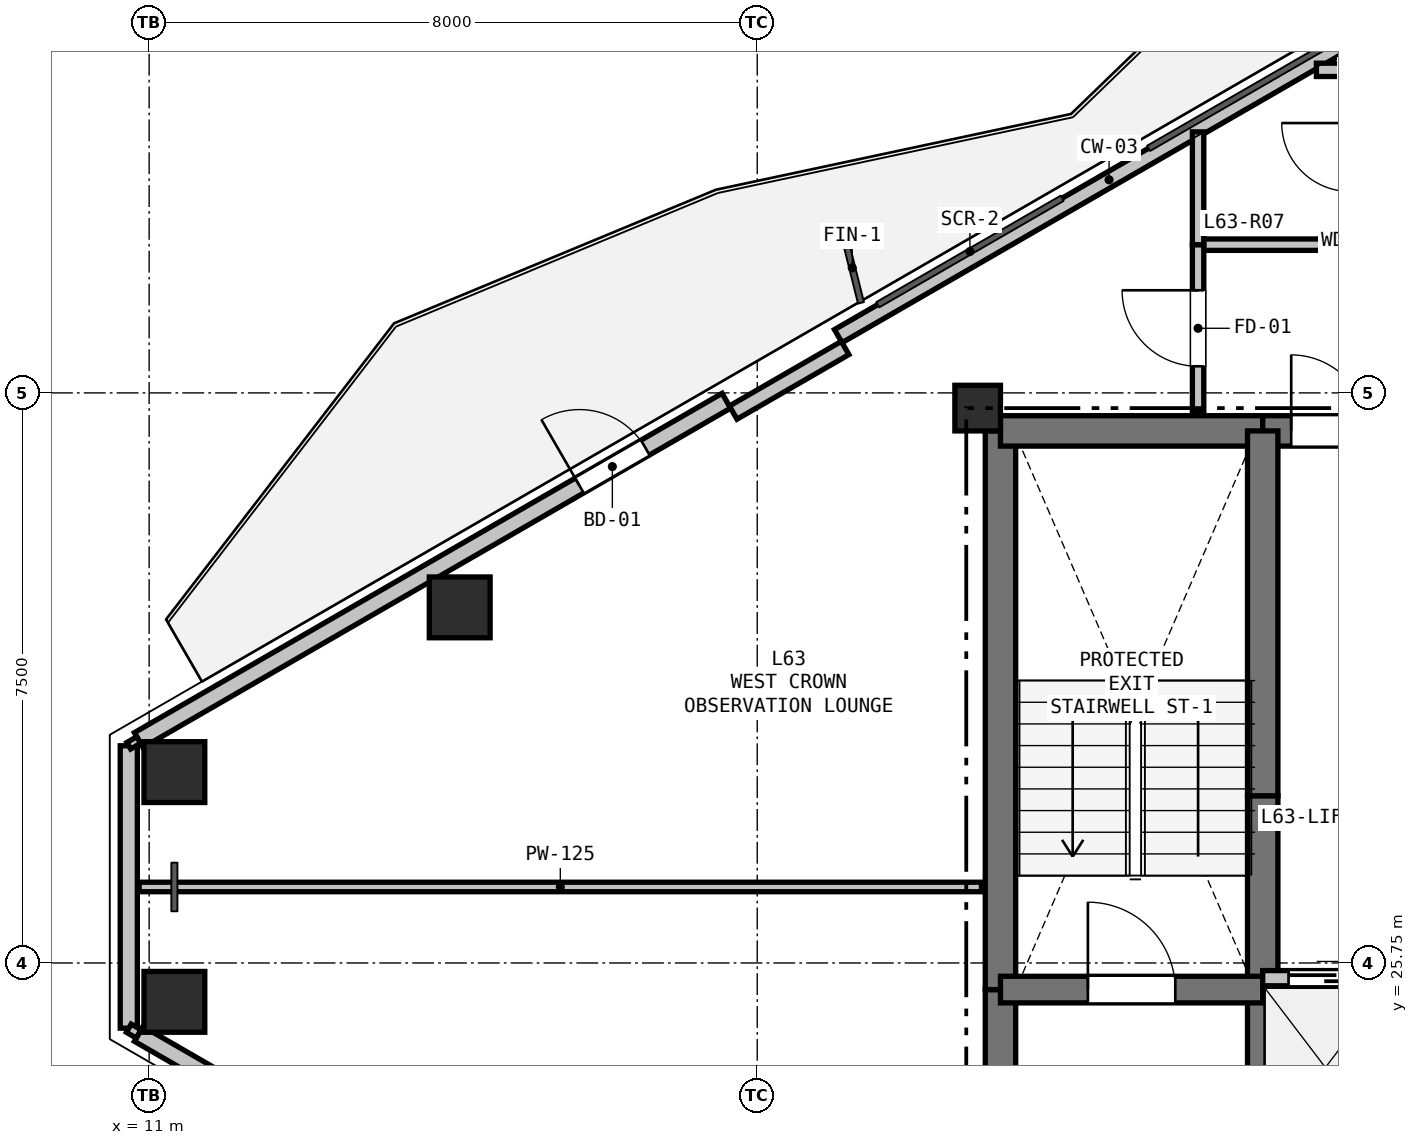
"""IFC4 building model, lengths in metres.
Left out: names, types, materials, properties, quantities, classifications, styles, units other than length and angle.
Written with IfcOpenShell. Run it as: python <this file> out.ifc"""

import sys

from ifc_helpers import new_model, si_unit, direction, frame, frame_2d, origin, origin_2d, place, context, subcontext, project, spatial, rectangle, hollow_rectangle, extrude, element, fill, save


model = new_model("IFC4")
c1 = context("Model", 3, precision=1e-05, world=origin(), true_north=direction((0.0, 1.0)))
c2 = subcontext(c1, "Body", "Model", "MODEL_VIEW")
j1 = project(units=[si_unit("LENGTHUNIT", "METRE"), si_unit("PLANEANGLEUNIT", "RADIAN")], contexts=[c1])
p1 = place(None, origin())
s1 = spatial("IfcSite", under=j1, at=p1, CompositionType="ELEMENT")
p2 = place(p1, origin())
s2 = spatial("IfcBuilding", under=s1, at=p2, CompositionType="ELEMENT")
p3 = place(p2, frame((0.0, 0.0, 226.5)))
s3 = spatial("IfcBuildingStorey", under=s2, at=p3, CompositionType="ELEMENT", Elevation=226.5)
p4 = place(p3, frame((21.9, 33.05, 0.0), z_axis=(0.0, 0.0, 1.0), x_axis=(1.0, 0.0, 0.0)))
e1 = element("IfcColumn", 1, at=p4, inside=s3, PredefinedType="COLUMN", context=c2, shape_type="SweptSolid", body=[
    extrude(rectangle(XDim=0.6, YDim=0.6, at=origin_2d()), origin(), (0.0, 0.0, 1.0), 3.3),
])
for number, where, z_axis, x_axis in (
    (2, (11.332, 28.261, 0.0), (0.0, 0.0, 1.0), (1.0, 0.0, 0.0)),
    (3, (15.086, 30.428, 0.0), (0.0, 0.0, 1.0), (1.0, 0.0, 0.0)),
    (4, (11.332, 25.239, 0.0), (0.0, 0.0, 1.0), (1.0, 0.0, 0.0)),
):
    element("IfcColumn", number, at=place(p3, frame(where, z_axis=z_axis, x_axis=x_axis)), inside=s3, PredefinedType="COLUMN", context=c2, shape_type="SweptSolid", body=[
        extrude(hollow_rectangle(XDim=0.8, YDim=0.8, WallThickness=0.025, at=origin_2d()), origin(), (0.0, 0.0, 1.0), 3.3),
    ])
p5 = place(p3, frame((10.732, 24.892, 0.0), z_axis=(0.0, 0.0, 1.0), x_axis=(0.0, 1.0, 0.0)))
e5 = element("IfcWall", 5, at=p5, inside=s3, PredefinedType="SOLIDWALL", context=c2, shape_type="SweptSolid", body=[
    extrude(rectangle(XDim=3.715, YDim=0.225, at=frame_2d((1.858, 0.0))), origin(), (0.0, 0.0, 1.0), 2.7),
])
p6 = place(p3, frame((10.862, 28.683, 0.0), z_axis=(0.0, 0.0, 1.0), x_axis=(0.866026655105, 0.499997832642, 0.0)))
e6 = element("IfcWall", 6, at=p6, inside=s3, PredefinedType="SOLIDWALL", context=c2, shape_type="SweptSolid", body=[
    extrude(rectangle(XDim=8.928, YDim=0.225, at=frame_2d((4.464, 0.0))), origin(), (0.0, 0.0, 1.0), 2.7),
])
p7 = place(p6, frame((6.696, 0.0, 0.0)))
e7 = element("IfcOpeningElement", 7, at=p7, cuts=e6, PredefinedType="OPENING", context=c2, shape_type="SweptSolid", body=[
    extrude(rectangle(XDim=1.0, YDim=2.1, at=frame_2d((0.5, 1.05))), frame((0.0, 0.123, 0.0), z_axis=(0.0, -1.0, 0.0), x_axis=(1.0, 0.0, 0.0)), (0.0, 0.0, 1.0), 0.245),
])
p8 = place(p3, frame((20.066, 33.997, 0.0), z_axis=(0.0, 0.0, 1.0), x_axis=(0.866019557082, 0.500010126649, 0.0)))
e8 = element("IfcWall", 8, at=p8, inside=s3, PredefinedType="PARAPET", context=c2, shape_type="SweptSolid", body=[
    extrude(rectangle(XDim=8.228, YDim=0.2, at=frame_2d((4.114, 0.0))), origin(), (0.0, 0.0, 1.0), 0.2),
])
p9 = place(p3, frame((18.684, 32.991, 0.0), z_axis=(0.0, 0.0, 1.0), x_axis=(0.866025371046, 0.500000056704, 0.0)))
e9 = element("IfcWall", 9, at=p9, inside=s3, PredefinedType="PARAPET", context=c2, shape_type="SweptSolid", body=[
    extrude(rectangle(XDim=1.7, YDim=0.2, at=frame_2d((0.85, 0.0))), origin(), (0.0, 0.0, 1.0), 2.7),
])
p10 = place(p3, frame((18.594, 20.354, 0.0), z_axis=(0.0, 0.0, 1.0), x_axis=(-0.866026655105, 0.499997832642, 0.0)))
e10 = element("IfcWall", 10, at=p10, inside=s3, PredefinedType="SOLIDWALL", context=c2, shape_type="SweptSolid", body=[
    extrude(rectangle(XDim=8.928, YDim=0.225, at=frame_2d((4.464, 0.0))), origin(), (0.0, 0.0, 1.0), 2.7),
])
p11 = place(p3, frame((22.2, 20.75, 0.0), z_axis=(0.0, 0.0, 1.0), x_axis=(0.0, 1.0, 0.0)))
e11 = element("IfcWall", 11, at=p11, inside=s3, PredefinedType="SHEAR", context=c2, shape_type="SweptSolid", body=[
    extrude(rectangle(XDim=4.65, YDim=0.4, at=frame_2d((2.325, 0.0))), origin(), (0.0, 0.0, 1.0), 3.08),
])
p12 = place(p3, frame((22.2, 25.4, 0.0), z_axis=(0.0, 0.0, 1.0), x_axis=(0.0, 1.0, 0.0)))
e12 = element("IfcWall", 12, at=p12, inside=s3, PredefinedType="SHEAR", context=c2, shape_type="SweptSolid", body=[
    extrude(rectangle(XDim=7.35, YDim=0.4, at=frame_2d((3.675, 0.0))), origin(), (0.0, 0.0, 1.0), 3.08),
])
p13 = place(p3, frame((22.2, 32.75, 0.0), z_axis=(0.0, 0.0, 1.0), x_axis=(1.0, 0.0, 0.0)))
e13 = element("IfcWall", 13, at=p13, inside=s3, PredefinedType="SHEAR", context=c2, shape_type="SweptSolid", body=[
    extrude(rectangle(XDim=3.45, YDim=0.4, at=frame_2d((1.725, 0.0))), origin(), (0.0, 0.0, 1.0), 3.08),
])
p14 = place(p3, frame((25.65, 32.75, 0.0), z_axis=(0.0, 0.0, 1.0), x_axis=(1.0, 0.0, 0.0)))
e14 = element("IfcWall", 14, at=p14, inside=s3, PredefinedType="SHEAR", context=c2, shape_type="SweptSolid", body=[
    extrude(rectangle(XDim=1.75, YDim=0.4, at=frame_2d((0.875, 0.0))), origin(), (0.0, 0.0, 1.0), 3.08),
])
p15 = place(p14, frame((0.375, 0.0, 0.0)))
e15 = element("IfcOpeningElement", 15, at=p15, cuts=e14, PredefinedType="OPENING", context=c2, shape_type="SweptSolid", body=[
    extrude(rectangle(XDim=1.0, YDim=2.15, at=frame_2d((0.5, 1.075))), frame((0.0, 0.21, 0.0), z_axis=(0.0, -1.0, 0.0), x_axis=(1.0, 0.0, 0.0)), (0.0, 0.0, 1.0), 0.42),
])
p16 = place(p3, frame((25.65, 22.75, 0.0), z_axis=(0.0, 0.0, 1.0), x_axis=(0.0, 1.0, 0.0)))
e16 = element("IfcWall", 16, at=p16, inside=s3, PredefinedType="SHEAR", context=c2, shape_type="SweptSolid", body=[
    extrude(rectangle(XDim=2.8, YDim=0.4, at=frame_2d((1.4, 0.0))), origin(), (0.0, 0.0, 1.0), 3.08),
])
p17 = place(p3, frame((25.65, 25.55, 0.0), z_axis=(0.0, 0.0, 1.0), x_axis=(0.0, 1.0, 0.0)))
e17 = element("IfcWall", 17, at=p17, inside=s3, PredefinedType="SHEAR", context=c2, shape_type="SweptSolid", body=[
    extrude(rectangle(XDim=2.4, YDim=0.4, at=frame_2d((1.2, 0.0))), origin(), (0.0, 0.0, 1.0), 3.08),
])
p18 = place(p3, frame((25.65, 27.95, 0.0), z_axis=(0.0, 0.0, 1.0), x_axis=(0.0, 1.0, 0.0)))
e18 = element("IfcWall", 18, at=p18, inside=s3, PredefinedType="SHEAR", context=c2, shape_type="SweptSolid", body=[
    extrude(rectangle(XDim=4.8, YDim=0.4, at=frame_2d((2.4, 0.0))), origin(), (0.0, 0.0, 1.0), 3.08),
])
p19 = place(p3, frame((22.2, 25.4, 0.0), z_axis=(0.0, 0.0, 1.0), x_axis=(1.0, 0.0, 0.0)))
e19 = element("IfcWall", 19, at=p19, inside=s3, PredefinedType="SHEAR", context=c2, shape_type="SweptSolid", body=[
    extrude(rectangle(XDim=3.45, YDim=0.35, at=frame_2d((1.725, 0.0))), origin(), (0.0, 0.0, 1.0), 3.08),
])
p20 = place(p19, frame((1.15, 0.0, 0.0)))
e20 = element("IfcOpeningElement", 20, at=p20, cuts=e19, PredefinedType="OPENING", context=c2, shape_type="SweptSolid", body=[
    extrude(rectangle(XDim=1.15, YDim=2.15, at=frame_2d((0.575, 1.075))), frame((0.0, 0.185, 0.0), z_axis=(0.0, -1.0, 0.0), x_axis=(1.0, 0.0, 0.0)), (0.0, 0.0, 1.0), 0.37),
])
p21 = place(p3, frame((25.65, 25.55, 0.0), z_axis=(0.0, 0.0, 1.0), x_axis=(1.0, 0.0, 0.0)))
e21 = element("IfcWall", 21, at=p21, inside=s3, PredefinedType="PARTITIONING", context=c2, shape_type="SweptSolid", body=[
    extrude(rectangle(XDim=4.95, YDim=0.2, at=frame_2d((2.475, 0.0))), origin(), (0.0, 0.0, 1.0), 3.08),
])
p22 = place(p21, frame((0.34, 0.0, 0.0)))
e22 = element("IfcOpeningElement", 22, at=p22, cuts=e21, PredefinedType="OPENING", context=c2, shape_type="SweptSolid", body=[
    extrude(rectangle(XDim=1.1, YDim=2.15, at=frame_2d((0.55, 1.075))), frame((0.0, 0.11, 0.0), z_axis=(0.0, -1.0, 0.0), x_axis=(1.0, 0.0, 0.0)), (0.0, 0.0, 1.0), 0.22),
])
p23 = place(p21, frame((1.99, 0.0, 0.0)))
e23 = element("IfcOpeningElement", 23, at=p23, cuts=e21, PredefinedType="OPENING", context=c2, shape_type="SweptSolid", body=[
    extrude(rectangle(XDim=1.1, YDim=2.15, at=frame_2d((0.55, 1.075))), frame((0.0, 0.11, 0.0), z_axis=(0.0, -1.0, 0.0), x_axis=(1.0, 0.0, 0.0)), (0.0, 0.0, 1.0), 0.22),
])
p24 = place(p21, frame((3.64, 0.0, 0.0)))
e24 = element("IfcOpeningElement", 24, at=p24, cuts=e21, PredefinedType="OPENING", context=c2, shape_type="SweptSolid", body=[
    extrude(rectangle(XDim=1.1, YDim=2.15, at=frame_2d((0.55, 1.075))), frame((0.0, 0.11, 0.0), z_axis=(0.0, -1.0, 0.0), x_axis=(1.0, 0.0, 0.0)), (0.0, 0.0, 1.0), 0.22),
])
p25 = place(p3, frame((24.8, 35.2, 0.0), z_axis=(0.0, 0.0, 1.0), x_axis=(1.0, 0.0, 0.0)))
e25 = element("IfcWall", 25, at=p25, inside=s3, PredefinedType="PARTITIONING", context=c2, shape_type="SweptSolid", body=[
    extrude(rectangle(XDim=2.0, YDim=0.15, at=frame_2d((1.0, 0.0))), origin(), (0.0, 0.0, 1.0), 3.08),
])
p26 = place(p3, frame((24.8, 33.0, 0.0), z_axis=(0.0, 0.0, 1.0), x_axis=(0.0, 1.0, 0.0)))
e26 = element("IfcWall", 26, at=p26, inside=s3, PredefinedType="PARTITIONING", context=c2, shape_type="SweptSolid", body=[
    extrude(rectangle(XDim=2.2, YDim=0.15, at=frame_2d((1.1, 0.0))), origin(), (0.0, 0.0, 1.0), 2.605),
])
p27 = place(p26, frame((0.6, 0.0, 0.0)))
e27 = element("IfcOpeningElement", 27, at=p27, cuts=e26, PredefinedType="OPENING", context=c2, shape_type="SweptSolid", body=[
    extrude(rectangle(XDim=1.0, YDim=2.15, at=frame_2d((0.5, 1.075))), frame((0.0, 0.085, 0.0), z_axis=(0.0, -1.0, 0.0), x_axis=(1.0, 0.0, 0.0)), (0.0, 0.0, 1.0), 0.17),
])
p28 = place(p3, frame((24.8, 35.2, 0.0), z_axis=(0.0, 0.0, 1.0), x_axis=(0.0, 1.0, 0.0)))
e28 = element("IfcWall", 28, at=p28, inside=s3, PredefinedType="PARTITIONING", context=c2, shape_type="SweptSolid", body=[
    extrude(rectangle(XDim=1.484, YDim=0.15, at=frame_2d((0.742, 0.0))), origin(), (0.0, 0.0, 1.0), 2.365),
])
p29 = place(p3, frame((26.357, 37.5, 0.0), z_axis=(0.0, 0.0, 1.0), x_axis=(1.0, 0.0, 0.0)))
e29 = element("IfcWall", 29, at=p29, inside=s3, PredefinedType="PLUMBINGWALL", context=c2, shape_type="SweptSolid", body=[
    extrude(rectangle(XDim=0.428, YDim=0.175, at=frame_2d((0.214, 0.0))), origin(), (0.0, 0.0, 1.0), 3.08),
])
p30 = place(p3, frame((21.95, 26.75, 0.0), z_axis=(0.0, 0.0, 1.0), x_axis=(-1.0, 0.0, 0.0)))
e30 = element("IfcWall", 30, at=p30, inside=s3, PredefinedType="PARTITIONING", context=c2, shape_type="SweptSolid", body=[
    extrude(rectangle(XDim=11.082, YDim=0.125, at=frame_2d((5.541, 0.0))), origin(), (0.0, 0.0, 1.0), 2.605),
])
p31 = place(p3, frame((10.732, 28.608, 0.0), z_axis=(0.0, 0.0, 1.0), x_axis=(0.866131372301, 0.499816412211, 0.0)))
e31 = element("IfcWall", 31, at=p31, inside=s3, PredefinedType="PARTITIONING", context=c2, shape_type="SweptSolid", body=[
    extrude(rectangle(XDim=0.15, YDim=0.1, at=frame_2d((0.075, 0.0))), origin(), (0.0, 0.0, 1.0), 3.08),
])
p32 = place(p3, frame((10.862, 24.817, 0.0), z_axis=(0.0, 0.0, 1.0), x_axis=(-0.866131372301, 0.499816412211, 0.0)))
e32 = element("IfcWall", 32, at=p32, inside=s3, PredefinedType="PARTITIONING", context=c2, shape_type="SweptSolid", body=[
    extrude(rectangle(XDim=0.15, YDim=0.125, at=frame_2d((0.075, 0.0))), origin(), (0.0, 0.0, 1.0), 3.08),
])
p33 = place(p7, origin())
e33 = element("IfcDoor", 33, at=p33, inside=s3, OperationType="SINGLE_SWING_LEFT", PredefinedType="DOOR", context=c2, shape_type="SweptSolid", body=[
    extrude(rectangle(XDim=1.0, YDim=2.1, at=frame_2d((0.5, 1.05))), frame((0.0, 0.025, 0.0), z_axis=(0.0, -1.0, 0.0), x_axis=(1.0, 0.0, 0.0)), (0.0, 0.0, 1.0), 0.05),
])
fill(e7, e33)
p34 = place(p22, origin())
e34 = element("IfcDoor", 34, at=p34, inside=s3, OperationType="SLIDING_TO_LEFT", PredefinedType="DOOR", context=c2, shape_type="SweptSolid", body=[
    extrude(rectangle(XDim=1.1, YDim=2.15, at=frame_2d((0.55, 1.075))), frame((0.0, 0.025, 0.0), z_axis=(0.0, -1.0, 0.0), x_axis=(1.0, 0.0, 0.0)), (0.0, 0.0, 1.0), 0.05),
])
fill(e22, e34)
p35 = place(p15, origin())
e35 = element("IfcDoor", 35, at=p35, inside=s3, OperationType="SINGLE_SWING_LEFT", PredefinedType="DOOR", context=c2, shape_type="SweptSolid", body=[
    extrude(rectangle(XDim=1.0, YDim=2.15, at=frame_2d((0.5, 1.075))), frame((0.0, 0.025, 0.0), z_axis=(0.0, -1.0, 0.0), x_axis=(1.0, 0.0, 0.0)), (0.0, 0.0, 1.0), 0.05),
])
fill(e15, e35)
p36 = place(p20, origin())
e36 = element("IfcDoor", 36, at=p36, inside=s3, OperationType="SINGLE_SWING_LEFT", PredefinedType="DOOR", context=c2, shape_type="SweptSolid", body=[
    extrude(rectangle(XDim=1.15, YDim=2.15, at=frame_2d((0.575, 1.075))), frame((0.0, 0.025, 0.0), z_axis=(0.0, -1.0, 0.0), x_axis=(1.0, 0.0, 0.0)), (0.0, 0.0, 1.0), 0.05),
])
fill(e20, e36)
p37 = place(p27, origin())
e37 = element("IfcDoor", 37, at=p37, inside=s3, OperationType="SINGLE_SWING_RIGHT", PredefinedType="DOOR", context=c2, shape_type="SweptSolid", body=[
    extrude(rectangle(XDim=1.0, YDim=2.15, at=frame_2d((0.5, 1.075))), frame((0.0, 0.025, 0.0), z_axis=(0.0, -1.0, 0.0), x_axis=(1.0, 0.0, 0.0)), (0.0, 0.0, 1.0), 0.05),
])
fill(e27, e37)
save(model, sys.argv[1])
